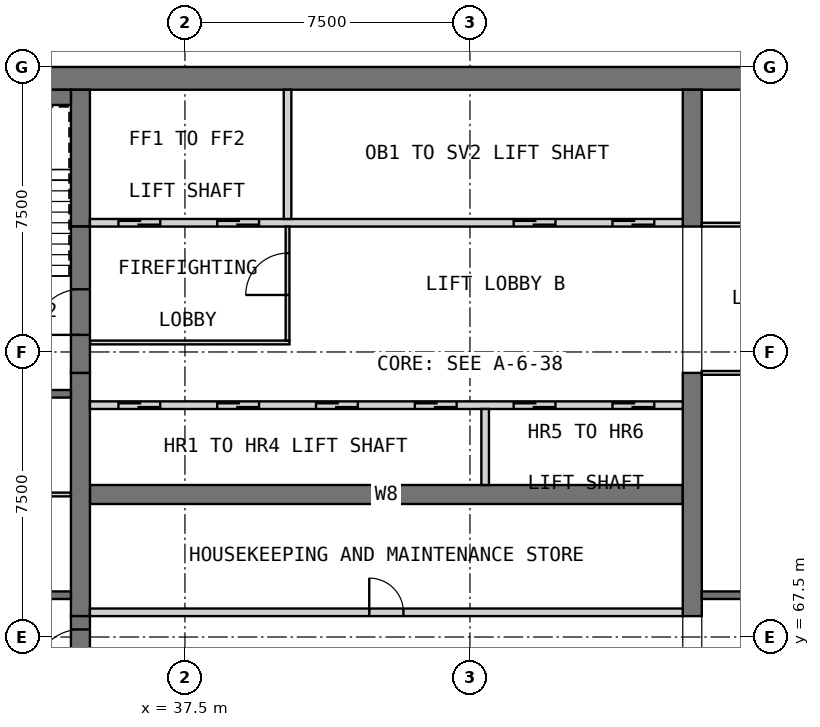
"""IFC4 building model, lengths in metres.
Left out: names, types, materials, properties, quantities, classifications, styles, units other than length and angle.
Written with IfcOpenShell. Run it as: python <this file> out.ifc"""

import sys

from ifc_helpers import new_model, si_unit, direction, frame, frame_2d, origin, place, context, subcontext, project, spatial, rectangle, extrude, element, fill, save


model = new_model("IFC4")
c1 = context("Model", 3, precision=1e-05, world=origin(), true_north=direction((0.0, 1.0)))
c2 = subcontext(c1, "Body", "Model", "MODEL_VIEW")
j1 = project(units=[si_unit("LENGTHUNIT", "METRE"), si_unit("PLANEANGLEUNIT", "RADIAN")], contexts=[c1])
p1 = place(None, origin())
s1 = spatial("IfcSite", under=j1, at=p1, CompositionType="ELEMENT")
p2 = place(p1, origin())
s2 = spatial("IfcBuilding", under=s1, at=p2, CompositionType="ELEMENT")
p3 = place(p2, frame((0.0, 0.0, 283.7)))
s3 = spatial("IfcBuildingStorey", under=s2, at=p3, CompositionType="ELEMENT", Elevation=283.7)
p4 = place(p3, frame((30.0, 82.2, 0.0), z_axis=(0.0, 0.0, 1.0), x_axis=(1.0, 0.0, 0.0)))
e1 = element("IfcWall", 1, at=p4, inside=s3, PredefinedType="SHEAR", context=c2, shape_type="SweptSolid", body=[
    extrude(rectangle(XDim=30.0, YDim=0.6, at=frame_2d((15.0, 0.0))), origin(), (0.0, 0.0, 1.0), 3.5),
])
p5 = place(p3, frame((35.0, 71.25, 0.0), z_axis=(0.0, 0.0, 1.0), x_axis=(1.0, 0.0, 0.0)))
e2 = element("IfcWall", 2, at=p5, inside=s3, PredefinedType="SHEAR", context=c2, shape_type="SweptSolid", body=[
    extrude(rectangle(XDim=15.6, YDim=0.5, at=frame_2d((7.8, 0.0))), origin(), (0.0, 0.0, 1.0), 3.5),
])
p6 = place(p3, frame((34.75, 68.05, 0.0), z_axis=(0.0, 0.0, 1.0), x_axis=(0.0, 1.0, 0.0)))
e3 = element("IfcWall", 3, at=p6, inside=s3, PredefinedType="SHEAR", context=c2, shape_type="SweptSolid", body=[
    extrude(rectangle(XDim=6.4, YDim=0.5, at=frame_2d((3.2, 0.0))), origin(), (0.0, 0.0, 1.0), 3.5),
])
p7 = place(p3, frame((34.75, 78.3, 0.0), z_axis=(0.0, 0.0, 1.0), x_axis=(0.0, 1.0, 0.0)))
e4 = element("IfcWall", 4, at=p7, inside=s3, PredefinedType="SHEAR", context=c2, shape_type="SweptSolid", body=[
    extrude(rectangle(XDim=3.6, YDim=0.5, at=frame_2d((1.8, 0.0))), origin(), (0.0, 0.0, 1.0), 3.5),
])
p8 = place(p3, frame((50.85, 68.05, 0.0), z_axis=(0.0, 0.0, 1.0), x_axis=(0.0, 1.0, 0.0)))
e5 = element("IfcWall", 5, at=p8, inside=s3, PredefinedType="SHEAR", context=c2, shape_type="SweptSolid", body=[
    extrude(rectangle(XDim=6.4, YDim=0.5, at=frame_2d((3.2, 0.0))), origin(), (0.0, 0.0, 1.0), 3.5),
])
p9 = place(p3, frame((50.85, 78.3, 0.0), z_axis=(0.0, 0.0, 1.0), x_axis=(0.0, 1.0, 0.0)))
e6 = element("IfcWall", 6, at=p9, inside=s3, PredefinedType="SHEAR", context=c2, shape_type="SweptSolid", body=[
    extrude(rectangle(XDim=3.6, YDim=0.5, at=frame_2d((1.8, 0.0))), origin(), (0.0, 0.0, 1.0), 3.5),
])
p10 = place(p3, frame((35.0, 68.15, 0.0), z_axis=(0.0, 0.0, 1.0), x_axis=(1.0, 0.0, 0.0)))
e7 = element("IfcWall", 7, at=p10, inside=s3, PredefinedType="PARTITIONING", context=c2, shape_type="SweptSolid", body=[
    extrude(rectangle(XDim=15.6, YDim=0.2, at=frame_2d((7.8, 0.0))), origin(), (0.0, 0.0, 1.0), 3.2),
])
p11 = place(p10, frame((7.35, 0.0, 0.0)))
e8 = element("IfcOpeningElement", 8, at=p11, cuts=e7, PredefinedType="OPENING", context=c2, shape_type="SweptSolid", body=[
    extrude(rectangle(XDim=0.9, YDim=2.1, at=frame_2d((0.45, 1.05))), frame((0.0, 0.11, 0.0), z_axis=(0.0, -1.0, 0.0), x_axis=(1.0, 0.0, 0.0)), (0.0, 0.0, 1.0), 0.22),
])
p12 = place(p3, frame((35.0, 73.6, 0.0), z_axis=(0.0, 0.0, 1.0), x_axis=(1.0, 0.0, 0.0)))
e9 = element("IfcWall", 9, at=p12, inside=s3, PredefinedType="SOLIDWALL", context=c2, shape_type="SweptSolid", body=[
    extrude(rectangle(XDim=15.6, YDim=0.2, at=frame_2d((7.8, 0.0))), origin(), (0.0, 0.0, 1.0), 3.5),
])
p13 = place(p12, frame((0.75, 0.0, 0.0)))
e10 = element("IfcOpeningElement", 10, at=p13, cuts=e9, PredefinedType="OPENING", context=c2, shape_type="SweptSolid", body=[
    extrude(rectangle(XDim=1.1, YDim=2.1, at=frame_2d((0.55, 1.05))), frame((0.0, 0.11, 0.0), z_axis=(0.0, -1.0, 0.0), x_axis=(1.0, 0.0, 0.0)), (0.0, 0.0, 1.0), 0.22),
])
p14 = place(p12, frame((3.35, 0.0, 0.0)))
e11 = element("IfcOpeningElement", 11, at=p14, cuts=e9, PredefinedType="OPENING", context=c2, shape_type="SweptSolid", body=[
    extrude(rectangle(XDim=1.1, YDim=2.1, at=frame_2d((0.55, 1.05))), frame((0.0, 0.11, 0.0), z_axis=(0.0, -1.0, 0.0), x_axis=(1.0, 0.0, 0.0)), (0.0, 0.0, 1.0), 0.22),
])
p15 = place(p12, frame((5.95, 0.0, 0.0)))
e12 = element("IfcOpeningElement", 12, at=p15, cuts=e9, PredefinedType="OPENING", context=c2, shape_type="SweptSolid", body=[
    extrude(rectangle(XDim=1.1, YDim=2.1, at=frame_2d((0.55, 1.05))), frame((0.0, 0.11, 0.0), z_axis=(0.0, -1.0, 0.0), x_axis=(1.0, 0.0, 0.0)), (0.0, 0.0, 1.0), 0.22),
])
p16 = place(p12, frame((8.55, 0.0, 0.0)))
e13 = element("IfcOpeningElement", 13, at=p16, cuts=e9, PredefinedType="OPENING", context=c2, shape_type="SweptSolid", body=[
    extrude(rectangle(XDim=1.1, YDim=2.1, at=frame_2d((0.55, 1.05))), frame((0.0, 0.11, 0.0), z_axis=(0.0, -1.0, 0.0), x_axis=(1.0, 0.0, 0.0)), (0.0, 0.0, 1.0), 0.22),
])
p17 = place(p12, frame((11.15, 0.0, 0.0)))
e14 = element("IfcOpeningElement", 14, at=p17, cuts=e9, PredefinedType="OPENING", context=c2, shape_type="SweptSolid", body=[
    extrude(rectangle(XDim=1.1, YDim=2.1, at=frame_2d((0.55, 1.05))), frame((0.0, 0.11, 0.0), z_axis=(0.0, -1.0, 0.0), x_axis=(1.0, 0.0, 0.0)), (0.0, 0.0, 1.0), 0.22),
])
p18 = place(p12, frame((13.75, 0.0, 0.0)))
e15 = element("IfcOpeningElement", 15, at=p18, cuts=e9, PredefinedType="OPENING", context=c2, shape_type="SweptSolid", body=[
    extrude(rectangle(XDim=1.1, YDim=2.1, at=frame_2d((0.55, 1.05))), frame((0.0, 0.11, 0.0), z_axis=(0.0, -1.0, 0.0), x_axis=(1.0, 0.0, 0.0)), (0.0, 0.0, 1.0), 0.22),
])
p19 = place(p3, frame((45.4, 71.5, 0.0), z_axis=(0.0, 0.0, 1.0), x_axis=(0.0, 1.0, 0.0)))
e16 = element("IfcWall", 16, at=p19, inside=s3, PredefinedType="SOLIDWALL", context=c2, shape_type="SweptSolid", body=[
    extrude(rectangle(XDim=2.0, YDim=0.2, at=frame_2d((1.0, 0.0))), origin(), (0.0, 0.0, 1.0), 3.5),
])
p20 = place(p3, frame((35.0, 78.4, 0.0), z_axis=(0.0, 0.0, 1.0), x_axis=(1.0, 0.0, 0.0)))
e17 = element("IfcWall", 17, at=p20, inside=s3, PredefinedType="SOLIDWALL", context=c2, shape_type="SweptSolid", body=[
    extrude(rectangle(XDim=15.6, YDim=0.2, at=frame_2d((7.8, 0.0))), origin(), (0.0, 0.0, 1.0), 3.5),
])
p21 = place(p20, frame((0.75, 0.0, 0.0)))
e18 = element("IfcOpeningElement", 18, at=p21, cuts=e17, PredefinedType="OPENING", context=c2, shape_type="SweptSolid", body=[
    extrude(rectangle(XDim=1.1, YDim=2.1, at=frame_2d((0.55, 1.05))), frame((0.0, 0.11, 0.0), z_axis=(0.0, -1.0, 0.0), x_axis=(1.0, 0.0, 0.0)), (0.0, 0.0, 1.0), 0.22),
])
p22 = place(p20, frame((3.35, 0.0, 0.0)))
e19 = element("IfcOpeningElement", 19, at=p22, cuts=e17, PredefinedType="OPENING", context=c2, shape_type="SweptSolid", body=[
    extrude(rectangle(XDim=1.1, YDim=2.1, at=frame_2d((0.55, 1.05))), frame((0.0, 0.11, 0.0), z_axis=(0.0, -1.0, 0.0), x_axis=(1.0, 0.0, 0.0)), (0.0, 0.0, 1.0), 0.22),
])
p23 = place(p20, frame((11.15, 0.0, 0.0)))
e20 = element("IfcOpeningElement", 20, at=p23, cuts=e17, PredefinedType="OPENING", context=c2, shape_type="SweptSolid", body=[
    extrude(rectangle(XDim=1.1, YDim=2.1, at=frame_2d((0.55, 1.05))), frame((0.0, 0.11, 0.0), z_axis=(0.0, -1.0, 0.0), x_axis=(1.0, 0.0, 0.0)), (0.0, 0.0, 1.0), 0.22),
])
p24 = place(p20, frame((13.75, 0.0, 0.0)))
e21 = element("IfcOpeningElement", 21, at=p24, cuts=e17, PredefinedType="OPENING", context=c2, shape_type="SweptSolid", body=[
    extrude(rectangle(XDim=1.1, YDim=2.1, at=frame_2d((0.55, 1.05))), frame((0.0, 0.11, 0.0), z_axis=(0.0, -1.0, 0.0), x_axis=(1.0, 0.0, 0.0)), (0.0, 0.0, 1.0), 0.22),
])
p25 = place(p3, frame((40.2, 78.5, 0.0), z_axis=(0.0, 0.0, 1.0), x_axis=(0.0, 1.0, 0.0)))
e22 = element("IfcWall", 22, at=p25, inside=s3, PredefinedType="SOLIDWALL", context=c2, shape_type="SweptSolid", body=[
    extrude(rectangle(XDim=3.4, YDim=0.2, at=frame_2d((1.7, 0.0))), origin(), (0.0, 0.0, 1.0), 3.5),
])
p26 = place(p3, frame((35.0, 75.25, 0.0), z_axis=(0.0, 0.0, 1.0), x_axis=(1.0, 0.0, 0.0)))
e23 = element("IfcWall", 23, at=p26, inside=s3, PredefinedType="PARTITIONING", context=c2, shape_type="SweptSolid", body=[
    extrude(rectangle(XDim=5.25, YDim=0.1, at=frame_2d((2.625, 0.0))), origin(), (0.0, 0.0, 1.0), 3.2),
])
p27 = place(p3, frame((40.2, 75.3, 0.0), z_axis=(0.0, 0.0, 1.0), x_axis=(0.0, 1.0, 0.0)))
e24 = element("IfcWall", 24, at=p27, inside=s3, PredefinedType="PARTITIONING", context=c2, shape_type="SweptSolid", body=[
    extrude(rectangle(XDim=3.0, YDim=0.1, at=frame_2d((1.5, 0.0))), origin(), (0.0, 0.0, 1.0), 3.2),
])
p28 = place(p27, frame((1.2, 0.0, 0.0)))
e25 = element("IfcOpeningElement", 25, at=p28, cuts=e24, PredefinedType="OPENING", context=c2, shape_type="SweptSolid", body=[
    extrude(rectangle(XDim=1.1, YDim=2.1, at=frame_2d((0.55, 1.05))), frame((0.0, 0.06, 0.0), z_axis=(0.0, -1.0, 0.0), x_axis=(1.0, 0.0, 0.0)), (0.0, 0.0, 1.0), 0.12),
])
p29 = place(p3, frame((34.75, 64.2, 0.0), z_axis=(0.0, 0.0, 1.0), x_axis=(0.0, 1.0, 0.0)))
e26 = element("IfcWall", 26, at=p29, inside=s3, PredefinedType="SOLIDWALL", context=c2, shape_type="SweptSolid", body=[
    extrude(rectangle(XDim=3.85, YDim=0.5, at=frame_2d((1.925, 0.0))), origin(), (0.0, 0.0, 1.0), 2.3),
])
p30 = place(p29, frame((2.3, 0.0, 0.0)))
e27 = element("IfcOpeningElement", 27, at=p30, cuts=e26, PredefinedType="OPENING", context=c2, shape_type="SweptSolid", body=[
    extrude(rectangle(XDim=1.2, YDim=2.1, at=frame_2d((0.6, 1.05))), frame((0.0, 0.26, 0.0), z_axis=(0.0, -1.0, 0.0), x_axis=(1.0, 0.0, 0.0)), (0.0, 0.0, 1.0), 0.52),
])
p31 = place(p3, frame((34.75, 74.45, 0.0), z_axis=(0.0, 0.0, 1.0), x_axis=(0.0, 1.0, 0.0)))
e28 = element("IfcWall", 28, at=p31, inside=s3, PredefinedType="SOLIDWALL", context=c2, shape_type="SweptSolid", body=[
    extrude(rectangle(XDim=3.85, YDim=0.5, at=frame_2d((1.925, 0.0))), origin(), (0.0, 0.0, 1.0), 2.3),
])
p32 = place(p31, frame((1.0, 0.0, 0.0)))
e29 = element("IfcOpeningElement", 29, at=p32, cuts=e28, PredefinedType="OPENING", context=c2, shape_type="SweptSolid", body=[
    extrude(rectangle(XDim=1.2, YDim=2.1, at=frame_2d((0.6, 1.05))), frame((0.0, 0.26, 0.0), z_axis=(0.0, -1.0, 0.0), x_axis=(1.0, 0.0, 0.0)), (0.0, 0.0, 1.0), 0.52),
])
p33 = place(p3, frame((30.6, 68.6, 0.0), z_axis=(0.0, 0.0, 1.0), x_axis=(1.0, 0.0, 0.0)))
e30 = element("IfcWall", 30, at=p33, inside=s3, PredefinedType="SOLIDWALL", context=c2, shape_type="SweptSolid", body=[
    extrude(rectangle(XDim=3.9, YDim=0.2, at=frame_2d((1.95, 0.0))), origin(), (0.0, 0.0, 1.0), 3.2),
])
p34 = place(p33, frame((1.7, 0.0, 0.0)))
e31 = element("IfcOpeningElement", 31, at=p34, cuts=e30, PredefinedType="OPENING", context=c2, shape_type="SweptSolid", body=[
    extrude(rectangle(XDim=0.9, YDim=2.1, at=frame_2d((0.45, 1.05))), frame((0.0, 0.11, 0.0), z_axis=(0.0, -1.0, 0.0), x_axis=(1.0, 0.0, 0.0)), (0.0, 0.0, 1.0), 0.22),
])
p35 = place(p3, frame((30.6, 73.9, 0.0), z_axis=(0.0, 0.0, 1.0), x_axis=(1.0, 0.0, 0.0)))
e32 = element("IfcWall", 32, at=p35, inside=s3, PredefinedType="SOLIDWALL", context=c2, shape_type="SweptSolid", body=[
    extrude(rectangle(XDim=3.9, YDim=0.2, at=frame_2d((1.95, 0.0))), origin(), (0.0, 0.0, 1.0), 3.2),
])
p36 = place(p35, frame((1.7, 0.0, 0.0)))
e33 = element("IfcOpeningElement", 33, at=p36, cuts=e32, PredefinedType="OPENING", context=c2, shape_type="SweptSolid", body=[
    extrude(rectangle(XDim=0.9, YDim=2.1, at=frame_2d((0.45, 1.05))), frame((0.0, 0.11, 0.0), z_axis=(0.0, -1.0, 0.0), x_axis=(1.0, 0.0, 0.0)), (0.0, 0.0, 1.0), 0.22),
])
p37 = place(p3, frame((51.1, 68.6, 0.0), z_axis=(0.0, 0.0, 1.0), x_axis=(1.0, 0.0, 0.0)))
e34 = element("IfcWall", 34, at=p37, inside=s3, PredefinedType="SOLIDWALL", context=c2, shape_type="SweptSolid", body=[
    extrude(rectangle(XDim=8.3, YDim=0.2, at=frame_2d((4.15, 0.0))), origin(), (0.0, 0.0, 1.0), 3.2),
])
p38 = place(p3, frame((31.0, 81.7, 0.0), z_axis=(0.0, 0.0, 1.0), x_axis=(1.0, 0.0, 0.0)))
e35 = element("IfcWall", 35, at=p38, inside=s3, PredefinedType="SOLIDWALL", context=c2, shape_type="SweptSolid", body=[
    extrude(rectangle(XDim=3.5, YDim=0.4, at=frame_2d((1.75, 0.0))), origin(), (0.0, 0.0, 1.0), 3.2),
])
p39 = place(p3, frame((30.6, 71.25, 0.0), z_axis=(0.0, 0.0, 1.0), x_axis=(1.0, 0.0, 0.0)))
e36 = element("IfcWall", 36, at=p39, inside=s3, PredefinedType="PARTITIONING", context=c2, shape_type="SweptSolid", body=[
    extrude(rectangle(XDim=3.9, YDim=0.1, at=frame_2d((1.95, 0.0))), origin(), (0.0, 0.0, 1.0), 3.2),
])
p40 = place(p3, frame((51.1, 74.45, 0.0), z_axis=(0.0, 0.0, 1.0), x_axis=(1.0, 0.0, 0.0)))
e37 = element("IfcWall", 37, at=p40, inside=s3, PredefinedType="PARTITIONING", context=c2, shape_type="SweptSolid", body=[
    extrude(rectangle(XDim=8.3, YDim=0.1, at=frame_2d((4.15, 0.0))), origin(), (0.0, 0.0, 1.0), 3.2),
])
p41 = place(p40, frame((3.7, 0.0, 0.0)))
e38 = element("IfcOpeningElement", 38, at=p41, cuts=e37, PredefinedType="OPENING", context=c2, shape_type="SweptSolid", body=[
    extrude(rectangle(XDim=0.9, YDim=2.1, at=frame_2d((0.45, 1.05))), frame((0.0, 0.06, 0.0), z_axis=(0.0, -1.0, 0.0), x_axis=(1.0, 0.0, 0.0)), (0.0, 0.0, 1.0), 0.12),
])
p42 = place(p3, frame((51.1, 78.35, 0.0), z_axis=(0.0, 0.0, 1.0), x_axis=(1.0, 0.0, 0.0)))
e39 = element("IfcWall", 39, at=p42, inside=s3, PredefinedType="PARTITIONING", context=c2, shape_type="SweptSolid", body=[
    extrude(rectangle(XDim=8.3, YDim=0.1, at=frame_2d((4.15, 0.0))), origin(), (0.0, 0.0, 1.0), 3.2),
])
p43 = place(p42, frame((3.7, 0.0, 0.0)))
e40 = element("IfcOpeningElement", 40, at=p43, cuts=e39, PredefinedType="OPENING", context=c2, shape_type="SweptSolid", body=[
    extrude(rectangle(XDim=0.9, YDim=2.1, at=frame_2d((0.45, 1.05))), frame((0.0, 0.06, 0.0), z_axis=(0.0, -1.0, 0.0), x_axis=(1.0, 0.0, 0.0)), (0.0, 0.0, 1.0), 0.12),
])
p44 = place(p11, origin())
e41 = element("IfcDoor", 41, at=p44, inside=s3, OperationType="SINGLE_SWING_LEFT", PredefinedType="DOOR", context=c2, shape_type="SweptSolid", body=[
    extrude(rectangle(XDim=0.9, YDim=2.1, at=frame_2d((0.45, 1.05))), frame((0.0, 0.025, 0.0), z_axis=(0.0, -1.0, 0.0), x_axis=(1.0, 0.0, 0.0)), (0.0, 0.0, 1.0), 0.05),
])
fill(e8, e41)
p45 = place(p13, origin())
e42 = element("IfcDoor", 42, at=p45, inside=s3, OperationType="DOUBLE_DOOR_SLIDING", PredefinedType="DOOR", context=c2, shape_type="SweptSolid", body=[
    extrude(rectangle(XDim=1.1, YDim=2.1, at=frame_2d((0.55, 1.05))), frame((0.0, 0.025, 0.0), z_axis=(0.0, -1.0, 0.0), x_axis=(1.0, 0.0, 0.0)), (0.0, 0.0, 1.0), 0.05),
])
fill(e10, e42)
p46 = place(p14, origin())
e43 = element("IfcDoor", 43, at=p46, inside=s3, OperationType="DOUBLE_DOOR_SLIDING", PredefinedType="DOOR", context=c2, shape_type="SweptSolid", body=[
    extrude(rectangle(XDim=1.1, YDim=2.1, at=frame_2d((0.55, 1.05))), frame((0.0, 0.025, 0.0), z_axis=(0.0, -1.0, 0.0), x_axis=(1.0, 0.0, 0.0)), (0.0, 0.0, 1.0), 0.05),
])
fill(e11, e43)
p47 = place(p15, origin())
e44 = element("IfcDoor", 44, at=p47, inside=s3, OperationType="DOUBLE_DOOR_SLIDING", PredefinedType="DOOR", context=c2, shape_type="SweptSolid", body=[
    extrude(rectangle(XDim=1.1, YDim=2.1, at=frame_2d((0.55, 1.05))), frame((0.0, 0.025, 0.0), z_axis=(0.0, -1.0, 0.0), x_axis=(1.0, 0.0, 0.0)), (0.0, 0.0, 1.0), 0.05),
])
fill(e12, e44)
p48 = place(p16, origin())
e45 = element("IfcDoor", 45, at=p48, inside=s3, OperationType="DOUBLE_DOOR_SLIDING", PredefinedType="DOOR", context=c2, shape_type="SweptSolid", body=[
    extrude(rectangle(XDim=1.1, YDim=2.1, at=frame_2d((0.55, 1.05))), frame((0.0, 0.025, 0.0), z_axis=(0.0, -1.0, 0.0), x_axis=(1.0, 0.0, 0.0)), (0.0, 0.0, 1.0), 0.05),
])
fill(e13, e45)
p49 = place(p17, origin())
e46 = element("IfcDoor", 46, at=p49, inside=s3, OperationType="DOUBLE_DOOR_SLIDING", PredefinedType="DOOR", context=c2, shape_type="SweptSolid", body=[
    extrude(rectangle(XDim=1.1, YDim=2.1, at=frame_2d((0.55, 1.05))), frame((0.0, 0.025, 0.0), z_axis=(0.0, -1.0, 0.0), x_axis=(1.0, 0.0, 0.0)), (0.0, 0.0, 1.0), 0.05),
])
fill(e14, e46)
p50 = place(p18, origin())
e47 = element("IfcDoor", 47, at=p50, inside=s3, OperationType="DOUBLE_DOOR_SLIDING", PredefinedType="DOOR", context=c2, shape_type="SweptSolid", body=[
    extrude(rectangle(XDim=1.1, YDim=2.1, at=frame_2d((0.55, 1.05))), frame((0.0, 0.025, 0.0), z_axis=(0.0, -1.0, 0.0), x_axis=(1.0, 0.0, 0.0)), (0.0, 0.0, 1.0), 0.05),
])
fill(e15, e47)
p51 = place(p21, origin())
e48 = element("IfcDoor", 48, at=p51, inside=s3, OperationType="DOUBLE_DOOR_SLIDING", PredefinedType="DOOR", context=c2, shape_type="SweptSolid", body=[
    extrude(rectangle(XDim=1.1, YDim=2.1, at=frame_2d((0.55, 1.05))), frame((0.0, 0.025, 0.0), z_axis=(0.0, -1.0, 0.0), x_axis=(1.0, 0.0, 0.0)), (0.0, 0.0, 1.0), 0.05),
])
fill(e18, e48)
p52 = place(p22, origin())
e49 = element("IfcDoor", 49, at=p52, inside=s3, OperationType="DOUBLE_DOOR_SLIDING", PredefinedType="DOOR", context=c2, shape_type="SweptSolid", body=[
    extrude(rectangle(XDim=1.1, YDim=2.1, at=frame_2d((0.55, 1.05))), frame((0.0, 0.025, 0.0), z_axis=(0.0, -1.0, 0.0), x_axis=(1.0, 0.0, 0.0)), (0.0, 0.0, 1.0), 0.05),
])
fill(e19, e49)
p53 = place(p23, origin())
e50 = element("IfcDoor", 50, at=p53, inside=s3, OperationType="DOUBLE_DOOR_SLIDING", PredefinedType="DOOR", context=c2, shape_type="SweptSolid", body=[
    extrude(rectangle(XDim=1.1, YDim=2.1, at=frame_2d((0.55, 1.05))), frame((0.0, 0.025, 0.0), z_axis=(0.0, -1.0, 0.0), x_axis=(1.0, 0.0, 0.0)), (0.0, 0.0, 1.0), 0.05),
])
fill(e20, e50)
p54 = place(p24, origin())
e51 = element("IfcDoor", 51, at=p54, inside=s3, OperationType="DOUBLE_DOOR_SLIDING", PredefinedType="DOOR", context=c2, shape_type="SweptSolid", body=[
    extrude(rectangle(XDim=1.1, YDim=2.1, at=frame_2d((0.55, 1.05))), frame((0.0, 0.025, 0.0), z_axis=(0.0, -1.0, 0.0), x_axis=(1.0, 0.0, 0.0)), (0.0, 0.0, 1.0), 0.05),
])
fill(e21, e51)
p55 = place(p28, origin())
e52 = element("IfcDoor", 52, at=p55, inside=s3, OperationType="SINGLE_SWING_LEFT", PredefinedType="DOOR", context=c2, shape_type="SweptSolid", body=[
    extrude(rectangle(XDim=1.1, YDim=2.1, at=frame_2d((0.55, 1.05))), frame((0.0, 0.025, 0.0), z_axis=(0.0, -1.0, 0.0), x_axis=(1.0, 0.0, 0.0)), (0.0, 0.0, 1.0), 0.05),
])
fill(e25, e52)
p56 = place(p30, origin())
e53 = element("IfcDoor", 53, at=p56, inside=s3, OperationType="SINGLE_SWING_LEFT", PredefinedType="DOOR", context=c2, shape_type="SweptSolid", body=[
    extrude(rectangle(XDim=1.2, YDim=2.1, at=frame_2d((0.6, 1.05))), frame((0.0, 0.025, 0.0), z_axis=(0.0, -1.0, 0.0), x_axis=(1.0, 0.0, 0.0)), (0.0, 0.0, 1.0), 0.05),
])
fill(e27, e53)
p57 = place(p32, origin())
e54 = element("IfcDoor", 54, at=p57, inside=s3, OperationType="SINGLE_SWING_RIGHT", PredefinedType="DOOR", context=c2, shape_type="SweptSolid", body=[
    extrude(rectangle(XDim=1.2, YDim=2.1, at=frame_2d((0.6, 1.05))), frame((0.0, 0.025, 0.0), z_axis=(0.0, -1.0, 0.0), x_axis=(1.0, 0.0, 0.0)), (0.0, 0.0, 1.0), 0.05),
])
fill(e29, e54)
save(model, sys.argv[1])
